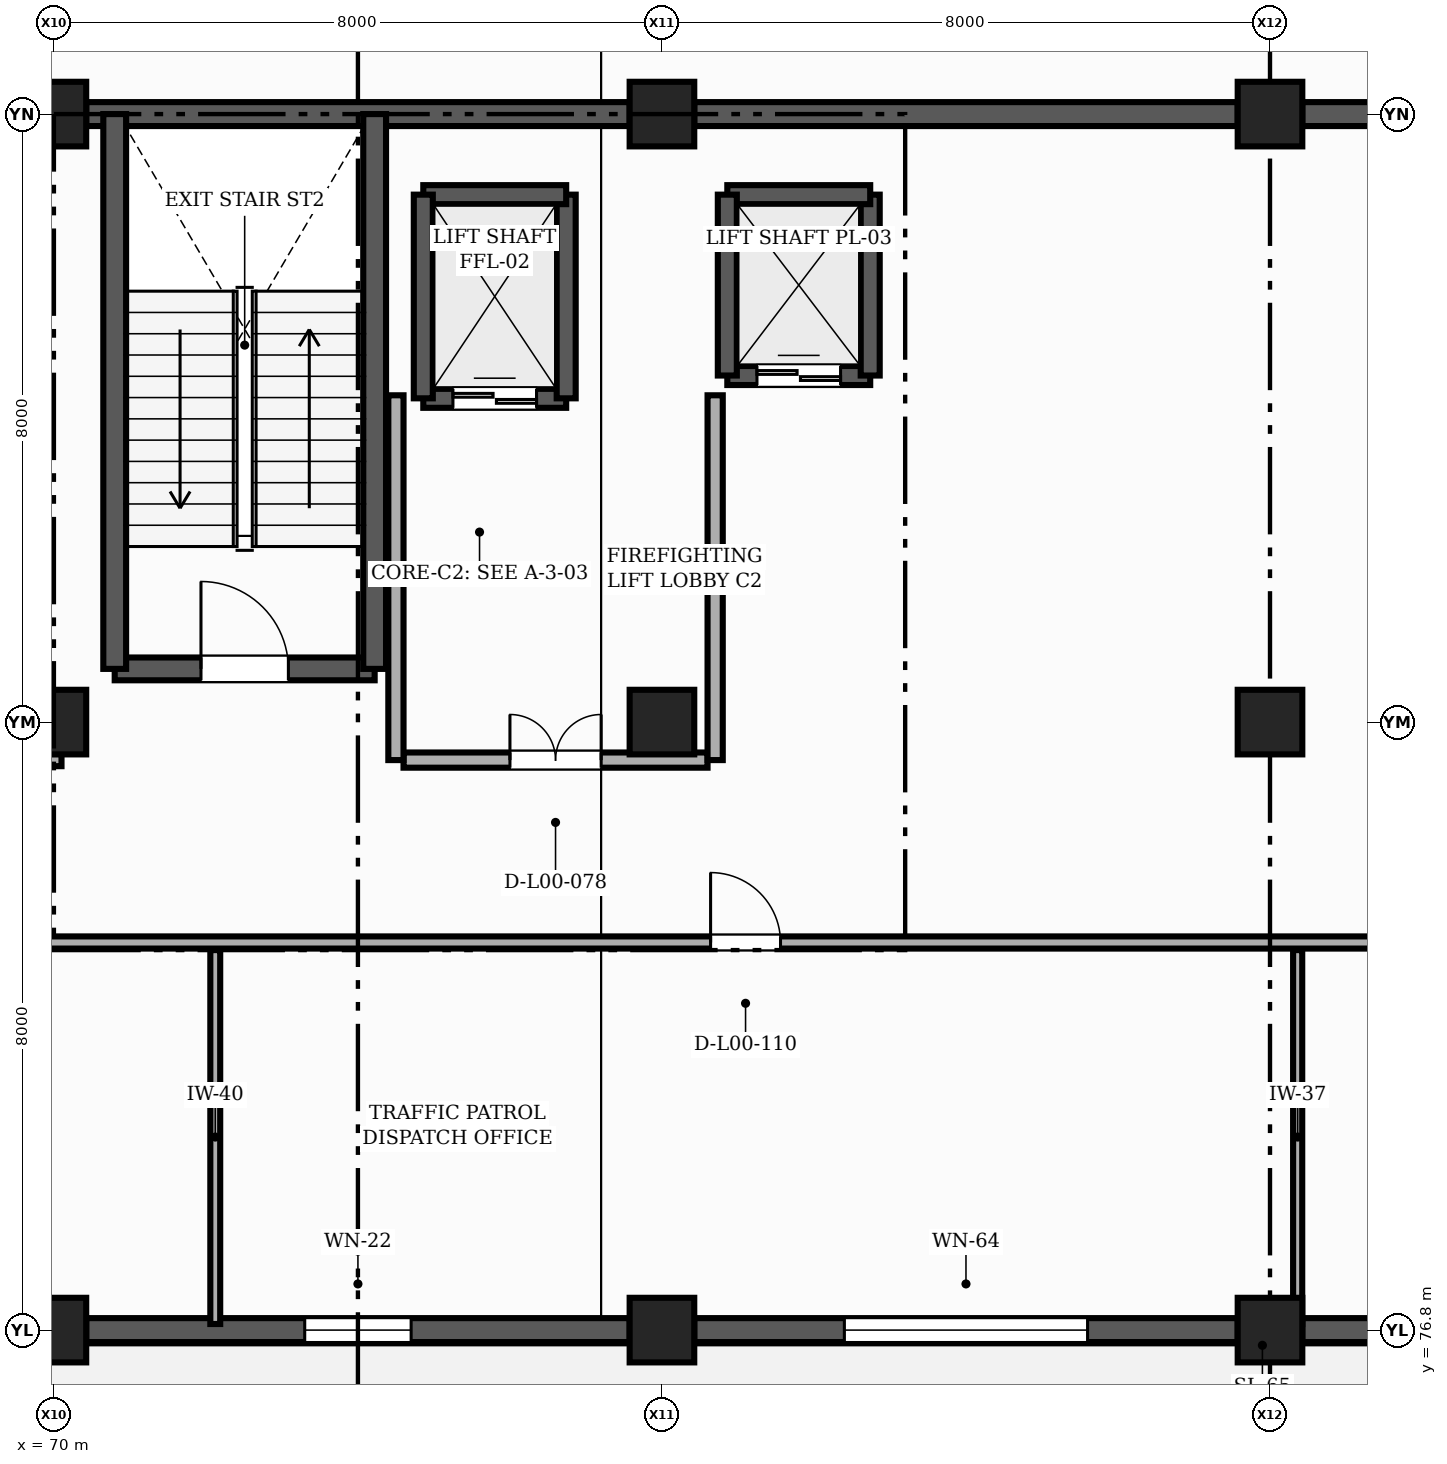
"""IFC4 building model, lengths in metres.
Left out: names, types, materials, properties, quantities, classifications, styles, units other than length and angle.
Written with IfcOpenShell. Run it as: python <this file> out.ifc"""

import sys

from ifc_helpers import new_model, si_unit, direction, frame, frame_2d, origin, origin_2d, place, context, subcontext, project, spatial, rectangle, extrude, element, fill, save


model = new_model("IFC4")
c1 = context("Model", 3, precision=1e-05, world=origin(), true_north=direction((0.0, 1.0)))
c2 = subcontext(c1, "Body", "Model", "MODEL_VIEW")
j1 = project(units=[si_unit("LENGTHUNIT", "METRE"), si_unit("PLANEANGLEUNIT", "RADIAN")], contexts=[c1])
p1 = place(None, origin())
s1 = spatial("IfcSite", under=j1, at=p1, CompositionType="ELEMENT")
p2 = place(p1, origin())
s2 = spatial("IfcBuilding", under=s1, at=p2, CompositionType="ELEMENT")
p3 = place(p2, origin())
s3 = spatial("IfcBuildingStorey", under=s2, at=p3, CompositionType="ELEMENT", Elevation=0.0)
for number, where, z_axis, x_axis in (
    (1, (70.0, 76.8, 0.0), (0.0, 0.0, 1.0), (1.0, 0.0, 0.0)),
    (2, (70.0, 84.8, 0.0), (0.0, 0.0, 1.0), (1.0, 0.0, 0.0)),
    (3, (70.0, 92.8, 0.0), (0.0, 0.0, 1.0), (1.0, 0.0, 0.0)),
    (4, (78.0, 76.8, 0.0), (0.0, 0.0, 1.0), (1.0, 0.0, 0.0)),
    (5, (78.0, 84.8, 0.0), (0.0, 0.0, 1.0), (1.0, 0.0, 0.0)),
    (6, (78.0, 92.8, 0.0), (0.0, 0.0, 1.0), (1.0, 0.0, 0.0)),
    (7, (86.0, 76.8, 0.0), (0.0, 0.0, 1.0), (1.0, 0.0, 0.0)),
    (8, (86.0, 84.8, 0.0), (0.0, 0.0, 1.0), (1.0, 0.0, 0.0)),
    (9, (86.0, 92.8, 0.0), (0.0, 0.0, 1.0), (1.0, 0.0, 0.0)),
):
    element("IfcColumn", number, at=place(p3, frame(where, z_axis=z_axis, x_axis=x_axis)), inside=s3, PredefinedType="COLUMN", context=c2, shape_type="SweptSolid", body=[
        extrude(rectangle(XDim=0.85, YDim=0.85, at=origin_2d()), origin(), (0.0, 0.0, 1.0), 4.8),
    ])
p4 = place(p3, frame((70.425, 76.8, 0.0), z_axis=(0.0, 0.0, 1.0), x_axis=(1.0, 0.0, 0.0)))
e10 = element("IfcWall", 10, at=p4, inside=s3, PredefinedType="SOLIDWALL", context=c2, shape_type="SweptSolid", body=[
    extrude(rectangle(XDim=7.15, YDim=0.315, at=frame_2d((3.575, 0.0))), origin(), (0.0, 0.0, 1.0), 3.78),
])
p5 = place(p4, frame((2.875, 0.0, 0.9)))
e11 = element("IfcOpeningElement", 11, at=p5, cuts=e10, PredefinedType="OPENING", context=c2, shape_type="SweptSolid", body=[
    extrude(rectangle(XDim=1.4, YDim=1.4, at=frame_2d((0.7, 0.7))), frame((0.0, 0.167, 0.0), z_axis=(0.0, -1.0, 0.0), x_axis=(1.0, 0.0, 0.0)), (0.0, 0.0, 1.0), 0.335),
])
p6 = place(p3, frame((78.425, 76.8, 0.0), z_axis=(0.0, 0.0, 1.0), x_axis=(1.0, 0.0, 0.0)))
e12 = element("IfcWall", 12, at=p6, inside=s3, PredefinedType="SOLIDWALL", context=c2, shape_type="SweptSolid", body=[
    extrude(rectangle(XDim=7.15, YDim=0.315, at=frame_2d((3.575, 0.0))), origin(), (0.0, 0.0, 1.0), 3.78),
])
p7 = place(p6, frame((1.975, 0.0, 0.9)))
e13 = element("IfcOpeningElement", 13, at=p7, cuts=e12, PredefinedType="OPENING", context=c2, shape_type="SweptSolid", body=[
    extrude(rectangle(XDim=3.2, YDim=2.0, at=frame_2d((1.6, 1.0))), frame((0.0, 0.167, 0.0), z_axis=(0.0, -1.0, 0.0), x_axis=(1.0, 0.0, 0.0)), (0.0, 0.0, 1.0), 0.335),
])
p8 = place(p3, frame((86.425, 76.8, 0.0), z_axis=(0.0, 0.0, 1.0), x_axis=(1.0, 0.0, 0.0)))
e14 = element("IfcWall", 14, at=p8, inside=s3, PredefinedType="SOLIDWALL", context=c2, shape_type="SweptSolid", body=[
    extrude(rectangle(XDim=7.225, YDim=0.315, at=frame_2d((3.612, 0.0))), origin(), (0.0, 0.0, 1.0), 3.78),
])
p9 = place(p8, frame((2.812, 0.0, 0.0)))
e15 = element("IfcOpeningElement", 15, at=p9, cuts=e14, PredefinedType="OPENING", context=c2, shape_type="SweptSolid", body=[
    extrude(rectangle(XDim=1.6, YDim=2.25, at=frame_2d((0.8, 1.125))), frame((0.0, 0.167, 0.0), z_axis=(0.0, -1.0, 0.0), x_axis=(1.0, 0.0, 0.0)), (0.0, 0.0, 1.0), 0.335),
])
p10 = place(p3, frame((93.65, 92.8, 0.0), z_axis=(0.0, 0.0, 1.0), x_axis=(-1.0, 0.0, 0.0)))
e16 = element("IfcWall", 16, at=p10, inside=s3, PredefinedType="SOLIDWALL", context=c2, shape_type="SweptSolid", body=[
    extrude(rectangle(XDim=7.225, YDim=0.315, at=frame_2d((3.612, 0.0))), origin(), (0.0, 0.0, 1.0), 3.78),
])
p11 = place(p10, frame((2.012, 0.0, 0.9)))
e17 = element("IfcOpeningElement", 17, at=p11, cuts=e16, PredefinedType="OPENING", context=c2, shape_type="SweptSolid", body=[
    extrude(rectangle(XDim=3.2, YDim=1.6, at=frame_2d((1.6, 0.8))), frame((0.0, 0.167, 0.0), z_axis=(0.0, -1.0, 0.0), x_axis=(1.0, 0.0, 0.0)), (0.0, 0.0, 1.0), 0.335),
])
p12 = place(p3, frame((85.575, 92.8, -0.42), z_axis=(0.0, 0.0, 1.0), x_axis=(-1.0, 0.0, 0.0)))
e18 = element("IfcWall", 18, at=p12, inside=s3, PredefinedType="SOLIDWALL", context=c2, shape_type="SweptSolid", body=[
    extrude(rectangle(XDim=7.15, YDim=0.315, at=frame_2d((3.575, 0.0))), origin(), (0.0, 0.0, 1.0), 4.2),
])
p13 = place(p3, frame((77.575, 92.8, -0.42), z_axis=(0.0, 0.0, 1.0), x_axis=(-1.0, 0.0, 0.0)))
e19 = element("IfcWall", 19, at=p13, inside=s3, PredefinedType="SOLIDWALL", context=c2, shape_type="SweptSolid", body=[
    extrude(rectangle(XDim=7.15, YDim=0.315, at=frame_2d((3.575, 0.0))), origin(), (0.0, 0.0, 1.0), 4.95),
])
p14 = place(p3, frame((70.8, 85.5, 0.0), z_axis=(0.0, 0.0, 1.0), x_axis=(1.0, 0.0, 0.0)))
e20 = element("IfcWall", 20, at=p14, inside=s3, PredefinedType="SHEAR", context=c2, shape_type="SweptSolid", body=[
    extrude(rectangle(XDim=3.42, YDim=0.3, at=frame_2d((1.71, 0.0))), origin(), (0.0, 0.0, 1.0), 4.8),
])
p15 = place(p14, frame((1.135, 0.0, 0.0)))
e21 = element("IfcOpeningElement", 21, at=p15, cuts=e20, PredefinedType="OPENING", context=c2, shape_type="SweptSolid", body=[
    extrude(rectangle(XDim=1.15, YDim=2.15, at=frame_2d((0.575, 1.075))), frame((0.0, 0.16, 0.0), z_axis=(0.0, -1.0, 0.0), x_axis=(1.0, 0.0, 0.0)), (0.0, 0.0, 1.0), 0.32),
])
for number, where, z_axis, x_axis in (
    (22, (74.22, 85.5, 0.0), (0.0, 0.0, 1.0), (0.0, 1.0, 0.0)),
    (23, (70.8, 92.8, 0.0), (0.0, 0.0, 1.0), (0.0, -1.0, 0.0)),
):
    element("IfcWall", number, at=place(p3, frame(where, z_axis=z_axis, x_axis=x_axis)), inside=s3, PredefinedType="SHEAR", context=c2, shape_type="SweptSolid", body=[
        extrude(rectangle(XDim=7.3, YDim=0.3, at=frame_2d((3.65, 0.0))), origin(), (0.0, 0.0, 1.0), 4.8),
    ])
p16 = place(p3, frame((74.86, 89.06, 0.0), z_axis=(0.0, 0.0, 1.0), x_axis=(1.0, 0.0, 0.0)))
e24 = element("IfcWall", 24, at=p16, inside=s3, PredefinedType="SHEAR", context=c2, shape_type="SweptSolid", body=[
    extrude(rectangle(XDim=1.88, YDim=0.25, at=frame_2d((0.94, 0.0))), origin(), (0.0, 0.0, 1.0), 4.8),
])
p17 = place(p16, frame((0.39, 0.0, 0.0)))
e25 = element("IfcOpeningElement", 25, at=p17, cuts=e24, PredefinedType="OPENING", context=c2, shape_type="SweptSolid", body=[
    extrude(rectangle(XDim=1.1, YDim=2.2, at=frame_2d((0.55, 1.1))), frame((0.0, 0.135, 0.0), z_axis=(0.0, -1.0, 0.0), x_axis=(1.0, 0.0, 0.0)), (0.0, 0.0, 1.0), 0.27),
])
p18 = place(p3, frame((76.74, 89.06, 0.0), z_axis=(0.0, 0.0, 1.0), x_axis=(0.0, 1.0, 0.0)))
e26 = element("IfcWall", 26, at=p18, inside=s3, PredefinedType="SHEAR", context=c2, shape_type="SweptSolid", body=[
    extrude(rectangle(XDim=2.68, YDim=0.25, at=frame_2d((1.34, 0.0))), origin(), (0.0, 0.0, 1.0), 4.8),
])
p19 = place(p3, frame((76.74, 91.74, 0.0), z_axis=(0.0, 0.0, 1.0), x_axis=(-1.0, 0.0, 0.0)))
e27 = element("IfcWall", 27, at=p19, inside=s3, PredefinedType="SHEAR", context=c2, shape_type="SweptSolid", body=[
    extrude(rectangle(XDim=1.88, YDim=0.25, at=frame_2d((0.94, 0.0))), origin(), (0.0, 0.0, 1.0), 4.8),
])
p20 = place(p3, frame((74.86, 91.74, 0.0), z_axis=(0.0, 0.0, 1.0), x_axis=(0.0, -1.0, 0.0)))
e28 = element("IfcWall", 28, at=p20, inside=s3, PredefinedType="SHEAR", context=c2, shape_type="SweptSolid", body=[
    extrude(rectangle(XDim=2.68, YDim=0.25, at=frame_2d((1.34, 0.0))), origin(), (0.0, 0.0, 1.0), 4.8),
])
p21 = place(p3, frame((78.86, 89.36, 0.0), z_axis=(0.0, 0.0, 1.0), x_axis=(1.0, 0.0, 0.0)))
e29 = element("IfcWall", 29, at=p21, inside=s3, PredefinedType="SHEAR", context=c2, shape_type="SweptSolid", body=[
    extrude(rectangle(XDim=1.88, YDim=0.25, at=frame_2d((0.94, 0.0))), origin(), (0.0, 0.0, 1.0), 4.8),
])
p22 = place(p21, frame((0.39, 0.0, 0.0)))
e30 = element("IfcOpeningElement", 30, at=p22, cuts=e29, PredefinedType="OPENING", context=c2, shape_type="SweptSolid", body=[
    extrude(rectangle(XDim=1.1, YDim=2.2, at=frame_2d((0.55, 1.1))), frame((0.0, 0.135, 0.0), z_axis=(0.0, -1.0, 0.0), x_axis=(1.0, 0.0, 0.0)), (0.0, 0.0, 1.0), 0.27),
])
p23 = place(p3, frame((80.74, 89.36, 0.0), z_axis=(0.0, 0.0, 1.0), x_axis=(0.0, 1.0, 0.0)))
e31 = element("IfcWall", 31, at=p23, inside=s3, PredefinedType="SHEAR", context=c2, shape_type="SweptSolid", body=[
    extrude(rectangle(XDim=2.38, YDim=0.25, at=frame_2d((1.19, 0.0))), origin(), (0.0, 0.0, 1.0), 4.8),
])
p24 = place(p3, frame((80.74, 91.74, 0.0), z_axis=(0.0, 0.0, 1.0), x_axis=(-1.0, 0.0, 0.0)))
e32 = element("IfcWall", 32, at=p24, inside=s3, PredefinedType="SHEAR", context=c2, shape_type="SweptSolid", body=[
    extrude(rectangle(XDim=1.88, YDim=0.25, at=frame_2d((0.94, 0.0))), origin(), (0.0, 0.0, 1.0), 4.8),
])
p25 = place(p3, frame((78.86, 91.74, 0.0), z_axis=(0.0, 0.0, 1.0), x_axis=(0.0, -1.0, 0.0)))
e33 = element("IfcWall", 33, at=p25, inside=s3, PredefinedType="SHEAR", context=c2, shape_type="SweptSolid", body=[
    extrude(rectangle(XDim=2.38, YDim=0.25, at=frame_2d((1.19, 0.0))), origin(), (0.0, 0.0, 1.0), 4.8),
])
p26 = place(p3, frame((74.6, 84.3, 0.0), z_axis=(0.0, 0.0, 1.0), x_axis=(1.0, 0.0, 0.0)))
e34 = element("IfcWall", 34, at=p26, inside=s3, PredefinedType="PARTITIONING", context=c2, shape_type="SweptSolid", body=[
    extrude(rectangle(XDim=4.0, YDim=0.2, at=frame_2d((2.0, 0.0))), origin(), (0.0, 0.0, 1.0), 3.765),
])
p27 = place(p26, frame((1.4, 0.0, 0.0)))
e35 = element("IfcOpeningElement", 35, at=p27, cuts=e34, PredefinedType="OPENING", context=c2, shape_type="SweptSolid", body=[
    extrude(rectangle(XDim=1.2, YDim=2.15, at=frame_2d((0.6, 1.075))), frame((0.0, 0.11, 0.0), z_axis=(0.0, -1.0, 0.0), x_axis=(1.0, 0.0, 0.0)), (0.0, 0.0, 1.0), 0.22),
])
p28 = place(p3, frame((74.5, 84.3, 0.0), z_axis=(0.0, 0.0, 1.0), x_axis=(0.0, 1.0, 0.0)))
e36 = element("IfcWall", 36, at=p28, inside=s3, PredefinedType="PARTITIONING", context=c2, shape_type="SweptSolid", body=[
    extrude(rectangle(XDim=4.8, YDim=0.2, at=frame_2d((2.4, 0.0))), origin(), (0.0, 0.0, 1.0), 3.915),
])
p29 = place(p3, frame((78.7, 84.3, 0.0), z_axis=(0.0, 0.0, 1.0), x_axis=(0.0, 1.0, 0.0)))
e37 = element("IfcWall", 37, at=p29, inside=s3, PredefinedType="PARTITIONING", context=c2, shape_type="SweptSolid", body=[
    extrude(rectangle(XDim=4.8, YDim=0.2, at=frame_2d((2.4, 0.0))), origin(), (0.0, 0.0, 1.0), 3.965),
])
p30 = place(p3, frame((72.123, 76.88, 0.0), z_axis=(0.0, 0.0, 1.0), x_axis=(0.0, 1.0, 0.0)))
e38 = element("IfcWall", 38, at=p30, inside=s3, PredefinedType="PARTITIONING", context=c2, shape_type="SweptSolid", body=[
    extrude(rectangle(XDim=4.92, YDim=0.13, at=frame_2d((2.46, 0.0))), origin(), (0.0, 0.0, 1.0), 3.765),
])
p31 = place(p3, frame((86.364, 76.88, 0.0), z_axis=(0.0, 0.0, 1.0), x_axis=(0.0, 1.0, 0.0)))
e39 = element("IfcWall", 39, at=p31, inside=s3, PredefinedType="PARTITIONING", context=c2, shape_type="SweptSolid", body=[
    extrude(rectangle(XDim=4.92, YDim=0.12, at=frame_2d((2.46, 0.0))), origin(), (0.0, 0.0, 1.0), 4.53),
])
p32 = place(p3, frame((29.3, 81.9, 0.0), z_axis=(0.0, 0.0, 1.0), x_axis=(1.0, 0.0, 0.0)))
e40 = element("IfcWall", 40, at=p32, inside=s3, PredefinedType="PARTITIONING", context=c2, shape_type="SweptSolid", body=[
    extrude(rectangle(XDim=72.62, YDim=0.16, at=frame_2d((36.31, 0.0))), origin(), (0.0, 0.0, 1.0), 3.765),
])
p33 = place(p32, frame((7.68, 0.0, 0.0)))
e41 = element("IfcOpeningElement", 41, at=p33, cuts=e40, PredefinedType="OPENING", context=c2, shape_type="SweptSolid", body=[
    extrude(rectangle(XDim=1.08, YDim=2.14, at=frame_2d((0.54, 1.07))), frame((0.0, 0.09, 0.0), z_axis=(0.0, -1.0, 0.0), x_axis=(1.0, 0.0, 0.0)), (0.0, 0.0, 1.0), 0.18),
])
p34 = place(p32, frame((23.6, 0.0, 0.0)))
e42 = element("IfcOpeningElement", 42, at=p34, cuts=e40, PredefinedType="OPENING", context=c2, shape_type="SweptSolid", body=[
    extrude(rectangle(XDim=1.1, YDim=2.1, at=frame_2d((0.55, 1.05))), frame((0.0, 0.09, 0.0), z_axis=(0.0, -1.0, 0.0), x_axis=(1.0, 0.0, 0.0)), (0.0, 0.0, 1.0), 0.18),
])
p35 = place(p32, frame((36.75, 0.0, 0.0)))
e43 = element("IfcOpeningElement", 43, at=p35, cuts=e40, PredefinedType="OPENING", context=c2, shape_type="SweptSolid", body=[
    extrude(rectangle(XDim=0.9, YDim=2.1, at=frame_2d((0.45, 1.05))), frame((0.0, 0.09, 0.0), z_axis=(0.0, -1.0, 0.0), x_axis=(1.0, 0.0, 0.0)), (0.0, 0.0, 1.0), 0.18),
])
p36 = place(p32, frame((49.34, 0.0, 0.0)))
e44 = element("IfcOpeningElement", 44, at=p36, cuts=e40, PredefinedType="OPENING", context=c2, shape_type="SweptSolid", body=[
    extrude(rectangle(XDim=0.92, YDim=2.1, at=frame_2d((0.46, 1.05))), frame((0.0, 0.09, 0.0), z_axis=(0.0, -1.0, 0.0), x_axis=(1.0, 0.0, 0.0)), (0.0, 0.0, 1.0), 0.18),
])
p37 = place(p32, frame((64.17, 0.0, 0.0)))
e45 = element("IfcOpeningElement", 45, at=p37, cuts=e40, PredefinedType="OPENING", context=c2, shape_type="SweptSolid", body=[
    extrude(rectangle(XDim=0.95, YDim=2.1, at=frame_2d((0.475, 1.05))), frame((0.0, 0.09, 0.0), z_axis=(0.0, -1.0, 0.0), x_axis=(1.0, 0.0, 0.0)), (0.0, 0.0, 1.0), 0.18),
])
p38 = place(p3, frame((34.7, 84.3, 0.0), z_axis=(0.0, 0.0, 1.0), x_axis=(1.0, 0.0, 0.0)))
e46 = element("IfcWall", 46, at=p38, inside=s3, PredefinedType="PARTITIONING", context=c2, shape_type="SweptSolid", body=[
    extrude(rectangle(XDim=35.4, YDim=0.16, at=frame_2d((17.7, 0.0))), origin(), (0.0, 0.0, 1.0), 3.765),
])
p39 = place(p38, frame((5.92, 0.0, 0.0)))
e47 = element("IfcOpeningElement", 47, at=p39, cuts=e46, PredefinedType="OPENING", context=c2, shape_type="SweptSolid", body=[
    extrude(rectangle(XDim=0.98, YDim=2.12, at=frame_2d((0.49, 1.06))), frame((0.0, 0.09, 0.0), z_axis=(0.0, -1.0, 0.0), x_axis=(1.0, 0.0, 0.0)), (0.0, 0.0, 1.0), 0.18),
])
p40 = place(p38, frame((17.2, 0.0, 0.0)))
e48 = element("IfcOpeningElement", 48, at=p40, cuts=e46, PredefinedType="OPENING", context=c2, shape_type="SweptSolid", body=[
    extrude(rectangle(XDim=0.95, YDim=2.15, at=frame_2d((0.475, 1.075))), frame((0.0, 0.09, 0.0), z_axis=(0.0, -1.0, 0.0), x_axis=(1.0, 0.0, 0.0)), (0.0, 0.0, 1.0), 0.18),
])
p41 = place(p38, frame((28.48, 0.0, 0.0)))
e49 = element("IfcOpeningElement", 49, at=p41, cuts=e46, PredefinedType="OPENING", context=c2, shape_type="SweptSolid", body=[
    extrude(rectangle(XDim=1.02, YDim=2.12, at=frame_2d((0.51, 1.06))), frame((0.0, 0.09, 0.0), z_axis=(0.0, -1.0, 0.0), x_axis=(1.0, 0.0, 0.0)), (0.0, 0.0, 1.0), 0.18),
])
p42 = place(p5, origin())
e50 = element("IfcWindow", 50, at=p42, inside=s3, PartitioningType="SINGLE_PANEL", PredefinedType="WINDOW", context=c2, shape_type="SweptSolid", body=[
    extrude(rectangle(XDim=1.4, YDim=1.4, at=frame_2d((0.7, 0.7))), frame((0.0, 0.03, 0.0), z_axis=(0.0, -1.0, 0.0), x_axis=(1.0, 0.0, 0.0)), (0.0, 0.0, 1.0), 0.06),
])
fill(e11, e50)
p43 = place(p7, origin())
e51 = element("IfcWindow", 51, at=p43, inside=s3, PartitioningType="SINGLE_PANEL", PredefinedType="WINDOW", context=c2, shape_type="SweptSolid", body=[
    extrude(rectangle(XDim=3.2, YDim=2.0, at=frame_2d((1.6, 1.0))), frame((0.0, 0.03, 0.0), z_axis=(0.0, -1.0, 0.0), x_axis=(1.0, 0.0, 0.0)), (0.0, 0.0, 1.0), 0.06),
])
fill(e13, e51)
p44 = place(p15, origin())
e52 = element("IfcDoor", 52, at=p44, inside=s3, OperationType="SINGLE_SWING_LEFT", PredefinedType="DOOR", context=c2, shape_type="SweptSolid", body=[
    extrude(rectangle(XDim=1.15, YDim=2.15, at=frame_2d((0.575, 1.075))), frame((0.0, 0.025, 0.0), z_axis=(0.0, -1.0, 0.0), x_axis=(1.0, 0.0, 0.0)), (0.0, 0.0, 1.0), 0.05),
])
fill(e21, e52)
p45 = place(p17, origin())
e53 = element("IfcDoor", 53, at=p45, inside=s3, OperationType="DOUBLE_DOOR_SLIDING", PredefinedType="DOOR", context=c2, shape_type="SweptSolid", body=[
    extrude(rectangle(XDim=1.1, YDim=2.2, at=frame_2d((0.55, 1.1))), frame((0.0, 0.025, 0.0), z_axis=(0.0, -1.0, 0.0), x_axis=(1.0, 0.0, 0.0)), (0.0, 0.0, 1.0), 0.05),
])
fill(e25, e53)
p46 = place(p22, origin())
e54 = element("IfcDoor", 54, at=p46, inside=s3, OperationType="DOUBLE_DOOR_SLIDING", PredefinedType="DOOR", context=c2, shape_type="SweptSolid", body=[
    extrude(rectangle(XDim=1.1, YDim=2.2, at=frame_2d((0.55, 1.1))), frame((0.0, 0.025, 0.0), z_axis=(0.0, -1.0, 0.0), x_axis=(1.0, 0.0, 0.0)), (0.0, 0.0, 1.0), 0.05),
])
fill(e30, e54)
p47 = place(p27, origin())
e55 = element("IfcDoor", 55, at=p47, inside=s3, OperationType="DOUBLE_DOOR_SINGLE_SWING", PredefinedType="DOOR", context=c2, shape_type="SweptSolid", body=[
    extrude(rectangle(XDim=1.2, YDim=2.15, at=frame_2d((0.6, 1.075))), frame((0.0, 0.025, 0.0), z_axis=(0.0, -1.0, 0.0), x_axis=(1.0, 0.0, 0.0)), (0.0, 0.0, 1.0), 0.05),
])
fill(e35, e55)
p48 = place(p36, origin())
e56 = element("IfcDoor", 56, at=p48, inside=s3, OperationType="SINGLE_SWING_LEFT", PredefinedType="DOOR", context=c2, shape_type="SweptSolid", body=[
    extrude(rectangle(XDim=0.92, YDim=2.1, at=frame_2d((0.46, 1.05))), frame((0.0, 0.025, 0.0), z_axis=(0.0, -1.0, 0.0), x_axis=(1.0, 0.0, 0.0)), (0.0, 0.0, 1.0), 0.05),
])
fill(e44, e56)
save(model, sys.argv[1])
